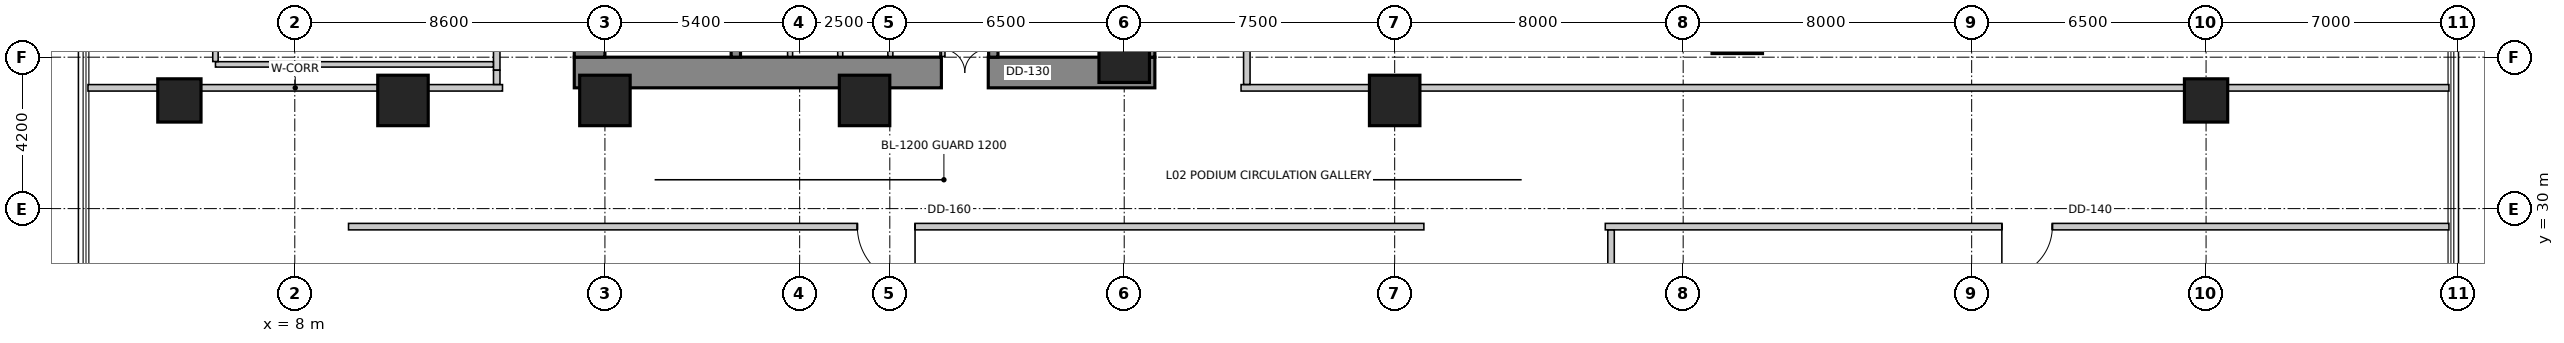
"""IFC4 building model, lengths in metres.
Left out: names, types, materials, properties, quantities, classifications, styles, units other than length and angle.
Written with IfcOpenShell. Run it as: python <this file> out.ifc"""

import sys

from ifc_helpers import new_model, si_unit, direction, frame, frame_2d, origin, origin_2d, place, context, subcontext, project, spatial, rectangle, extrude, source, transform, mapped, element, fill, save


model = new_model("IFC4")
c1 = context("Model", 3, precision=1e-05, world=origin(), true_north=direction((0.0, 1.0)))
c2 = subcontext(c1, "Body", "Model", "MODEL_VIEW")
j1 = project(units=[si_unit("LENGTHUNIT", "METRE"), si_unit("PLANEANGLEUNIT", "RADIAN")], contexts=[c1])
p1 = place(None, origin())
s1 = spatial("IfcSite", under=j1, at=p1, CompositionType="ELEMENT")
p2 = place(p1, origin())
s2 = spatial("IfcBuilding", under=s1, at=p2, CompositionType="ELEMENT")
p3 = place(p2, frame((0.0, 0.0, 6.0)))
s3 = spatial("IfcBuildingStorey", under=s2, at=p3, CompositionType="ELEMENT", Elevation=6.0)
p4 = place(p3, frame((15.75, 33.775, 0.0), z_axis=(0.0, 0.0, 1.0), x_axis=(1.0, 0.0, 0.0)))
e1 = element("IfcWall", 1, at=p4, inside=s3, PredefinedType="SHEAR", context=c2, shape_type="SweptSolid", body=[
    extrude(rectangle(XDim=16.1, YDim=0.85, at=frame_2d((8.05, 0.0))), origin(), (0.0, 0.0, 1.0), 5.2),
])
m1 = source(origin(), c2, "Body", "SweptSolid", [
    extrude(rectangle(XDim=1.3, YDim=2.15, at=frame_2d((0.65, 1.075))), frame((0.0, 0.435, 0.0), z_axis=(0.0, -1.0, 0.0), x_axis=(1.0, 0.0, 0.0)), (0.0, 0.0, 1.0), 0.87),
])
p5 = place(p4, frame((10.18, 0.0, 0.0)))
e2 = element("IfcOpeningElement", 2, at=p5, cuts=e1, PredefinedType="OPENING", context=c2, shape_type="MappedRepresentation", body=[
    mapped(m1, transform((0.0, 0.0, 0.0), scale=1.0)),
])
p6 = place(p3, frame((16.175, 34.2, 0.0), z_axis=(0.0, 0.0, 1.0), x_axis=(0.0, 1.0, 0.0)))
e3 = element("IfcWall", 3, at=p6, inside=s3, PredefinedType="SHEAR", context=c2, shape_type="SweptSolid", body=[
    extrude(rectangle(XDim=11.4, YDim=0.85, at=frame_2d((5.7, 0.0))), origin(), (0.0, 0.0, 1.0), 5.2),
])
m2 = source(origin(), c2, "Body", "SweptSolid", [
    extrude(rectangle(XDim=1.1, YDim=2.15, at=frame_2d((0.55, 1.075))), frame((0.0, 0.435, 0.0), z_axis=(0.0, -1.0, 0.0), x_axis=(1.0, 0.0, 0.0)), (0.0, 0.0, 1.0), 0.87),
])
p7 = place(p6, frame((7.15, 0.0, 0.0)))
e4 = element("IfcOpeningElement", 4, at=p7, cuts=e3, PredefinedType="OPENING", context=c2, shape_type="MappedRepresentation", body=[
    mapped(m2, transform((0.0, 0.0, 0.0), scale=1.0)),
])
p8 = place(p3, frame((31.425, 34.2, 0.0), z_axis=(0.0, 0.0, 1.0), x_axis=(0.0, 1.0, 0.0)))
e5 = element("IfcWall", 5, at=p8, inside=s3, PredefinedType="SHEAR", context=c2, shape_type="SweptSolid", body=[
    extrude(rectangle(XDim=11.4, YDim=0.85, at=frame_2d((5.7, 0.0))), origin(), (0.0, 0.0, 1.0), 5.2),
])
p9 = place(p8, frame((7.35, 0.0, 0.0)))
e6 = element("IfcOpeningElement", 6, at=p9, cuts=e5, PredefinedType="OPENING", context=c2, shape_type="MappedRepresentation", body=[
    mapped(m2, transform((0.0, 0.0, 0.0), scale=1.0)),
])
p10 = place(p3, frame((20.23, 34.2, 0.0), z_axis=(0.0, 0.0, 1.0), x_axis=(0.0, 1.0, 0.0)))
e7 = element("IfcWall", 7, at=p10, inside=s3, PredefinedType="SHEAR", context=c2, shape_type="SweptSolid", body=[
    extrude(rectangle(XDim=9.06, YDim=0.26, at=frame_2d((4.53, 0.0))), origin(), (0.0, 0.0, 1.0), 5.2),
])
m3 = source(origin(), c2, "Body", "SweptSolid", [
    extrude(rectangle(XDim=1.1, YDim=2.15, at=frame_2d((0.55, 1.075))), frame((0.0, 0.14, 0.0), z_axis=(0.0, -1.0, 0.0), x_axis=(1.0, 0.0, 0.0)), (0.0, 0.0, 1.0), 0.28),
])
p11 = place(p10, frame((7.45, 0.0, 0.0)))
e8 = element("IfcOpeningElement", 8, at=p11, cuts=e7, PredefinedType="OPENING", context=c2, shape_type="MappedRepresentation", body=[
    mapped(m3, transform((0.0, 0.0, 0.0), scale=1.0)),
])
p12 = place(p3, frame((27.37, 34.2, 0.0), z_axis=(0.0, 0.0, 1.0), x_axis=(0.0, 1.0, 0.0)))
e9 = element("IfcWall", 9, at=p12, inside=s3, PredefinedType="SHEAR", context=c2, shape_type="SweptSolid", body=[
    extrude(rectangle(XDim=9.06, YDim=0.26, at=frame_2d((4.53, 0.0))), origin(), (0.0, 0.0, 1.0), 5.2),
])
p13 = place(p12, frame((7.45, 0.0, 0.0)))
e10 = element("IfcOpeningElement", 10, at=p13, cuts=e9, PredefinedType="OPENING", context=c2, shape_type="MappedRepresentation", body=[
    mapped(m3, transform((0.0, 0.0, 0.0), scale=1.0)),
])
m4 = source(origin(), c2, "Body", "SweptSolid", [
    extrude(rectangle(XDim=1.2, YDim=1.2, at=origin_2d()), origin(), (0.0, 0.0, 1.0), 5.2),
])
p14 = place(p3, frame((4.8, 33.0, 0.0), z_axis=(0.0, 0.0, 1.0), x_axis=(1.0, 0.0, 0.0)))
e11 = element("IfcColumn", 11, at=p14, inside=s3, PredefinedType="COLUMN", context=c2, shape_type="MappedRepresentation", body=[
    mapped(m4, transform((0.0, 0.0, 0.0), scale=1.0)),
])
m5 = source(origin(), c2, "Body", "SweptSolid", [
    extrude(rectangle(XDim=1.4, YDim=1.4, at=origin_2d()), origin(), (0.0, 0.0, 1.0), 5.2),
])
for number, where, z_axis, x_axis in (
    (12, (11.0, 33.0, 0.0), (0.0, 0.0, 1.0), (1.0, 0.0, 0.0)),
    (13, (16.6, 33.0, 0.0), (0.0, 0.0, 1.0), (1.0, 0.0, 0.0)),
    (14, (23.8, 33.0, 0.0), (0.0, 0.0, 1.0), (1.0, 0.0, 0.0)),
    (15, (31.0, 34.2, 0.0), (0.0, 0.0, 1.0), (1.0, 0.0, 0.0)),
    (16, (38.5, 33.0, 0.0), (0.0, 0.0, 1.0), (1.0, 0.0, 0.0)),
    (17, (48.0, 35.0, 0.0), (0.0, 0.0, 1.0), (1.0, 0.0, 0.0)),
):
    element("IfcColumn", number, at=place(p3, frame(where, z_axis=z_axis, x_axis=x_axis)), inside=s3, PredefinedType="COLUMN", context=c2, shape_type="MappedRepresentation", body=[
        mapped(m5, transform((0.0, 0.0, 0.0), scale=1.0)),
    ])
p15 = place(p3, frame((61.0, 33.0, 0.0), z_axis=(0.0, 0.0, 1.0), x_axis=(1.0, 0.0, 0.0)))
e18 = element("IfcColumn", 18, at=p15, inside=s3, PredefinedType="COLUMN", context=c2, shape_type="MappedRepresentation", body=[
    mapped(m4, transform((0.0, 0.0, 0.0), scale=1.0)),
])
for number, where, z_axis, x_axis in (
    (19, (25.96, 34.22, 0.0), (0.0, 0.0, 1.0), (0.0, 1.0, 0.0)),
    (20, (21.735, 34.22, 0.0), (0.0, 0.0, 1.0), (0.0, 1.0, 0.0)),
    (21, (23.125, 34.22, 0.0), (0.0, 0.0, 1.0), (0.0, 1.0, 0.0)),
    (22, (24.515, 34.22, 0.0), (0.0, 0.0, 1.0), (0.0, 1.0, 0.0)),
):
    element("IfcWall", number, at=place(p3, frame(where, z_axis=z_axis, x_axis=x_axis)), inside=s3, PredefinedType="SOLIDWALL", context=c2, shape_type="SweptSolid", body=[
        extrude(rectangle(XDim=1.62, YDim=0.14, at=frame_2d((0.81, 0.0))), origin(), (0.0, 0.0, 1.0), 4.9),
    ])
p16 = place(p3, frame((2.265, 33.35, 0.0), z_axis=(0.0, 0.0, 1.0), x_axis=(1.0, 0.0, 0.0)))
e23 = element("IfcWall", 23, at=p16, inside=s3, PredefinedType="PARTITIONING", context=c2, shape_type="SweptSolid", body=[
    extrude(rectangle(XDim=11.495, YDim=0.18, at=frame_2d((5.748, 0.0))), origin(), (0.0, 0.0, 1.0), 3.692),
])
p17 = place(p3, frame((39.31, 29.5, 0.0), z_axis=(0.0, 0.0, 1.0), x_axis=(-1.0, 0.0, 0.0)))
e24 = element("IfcWall", 24, at=p17, inside=s3, PredefinedType="PARTITIONING", context=c2, shape_type="SweptSolid", body=[
    extrude(rectangle(XDim=29.82, YDim=0.18, at=frame_2d((14.91, 0.0))), origin(), (0.0, 0.0, 1.0), 4.03),
])
m6 = source(origin(), c2, "Body", "SweptSolid", [
    extrude(rectangle(XDim=1.6, YDim=2.15, at=frame_2d((0.8, 1.075))), frame((0.0, 0.1, 0.0), z_axis=(0.0, -1.0, 0.0), x_axis=(1.0, 0.0, 0.0)), (0.0, 0.0, 1.0), 0.2),
])
p18 = place(p17, frame((14.11, 0.0, 0.0)))
e25 = element("IfcOpeningElement", 25, at=p18, cuts=e24, PredefinedType="OPENING", context=c2, shape_type="MappedRepresentation", body=[
    mapped(m6, transform((0.0, 0.0, 0.0), scale=1.0)),
])
p19 = place(p3, frame((67.735, 29.5, 0.0), z_axis=(0.0, 0.0, 1.0), x_axis=(-1.0, 0.0, 0.0)))
e26 = element("IfcWall", 26, at=p19, inside=s3, PredefinedType="PARTITIONING", context=c2, shape_type="SweptSolid", body=[
    extrude(rectangle(XDim=23.395, YDim=0.18, at=frame_2d((11.698, 0.0))), origin(), (0.0, 0.0, 1.0), 3.092),
])
m7 = source(origin(), c2, "Body", "SweptSolid", [
    extrude(rectangle(XDim=1.4, YDim=2.15, at=frame_2d((0.7, 1.075))), frame((0.0, 0.1, 0.0), z_axis=(0.0, -1.0, 0.0), x_axis=(1.0, 0.0, 0.0)), (0.0, 0.0, 1.0), 0.2),
])
p20 = place(p19, frame((10.998, 0.0, 0.0)))
e27 = element("IfcOpeningElement", 27, at=p20, cuts=e26, PredefinedType="OPENING", context=c2, shape_type="MappedRepresentation", body=[
    mapped(m7, transform((0.0, 0.0, 0.0), scale=1.0)),
])
p21 = place(p3, frame((34.24, 33.35, 0.0), z_axis=(0.0, 0.0, 1.0), x_axis=(1.0, 0.0, 0.0)))
e28 = element("IfcWall", 28, at=p21, inside=s3, PredefinedType="PARTITIONING", context=c2, shape_type="SweptSolid", body=[
    extrude(rectangle(XDim=33.495, YDim=0.18, at=frame_2d((16.748, 0.0))), origin(), (0.0, 0.0, 1.0), 3.092),
])
p22 = place(p3, frame((44.5, 29.406, 0.0), z_axis=(0.0, 0.0, 1.0), x_axis=(0.0, -1.0, 0.0)))
e29 = element("IfcWall", 29, at=p22, inside=s3, PredefinedType="PARTITIONING", context=c2, shape_type="SweptSolid", body=[
    extrude(rectangle(XDim=15.006, YDim=0.18, at=frame_2d((7.503, 0.0))), origin(), (0.0, 0.0, 1.0), 3.692),
])
p23 = place(p3, frame((13.6, 33.84, 0.0), z_axis=(0.0, 0.0, 1.0), x_axis=(0.0, 1.0, 0.0)))
e30 = element("IfcWall", 30, at=p23, inside=s3, PredefinedType="PARTITIONING", context=c2, shape_type="SweptSolid", body=[
    extrude(rectangle(XDim=5.32, YDim=0.18, at=frame_2d((2.66, 0.0))), origin(), (0.0, 0.0, 1.0), 4.9),
])
m8 = source(origin(), c2, "Body", "SweptSolid", [
    extrude(rectangle(XDim=0.9, YDim=2.15, at=frame_2d((0.45, 1.075))), frame((0.0, 0.1, 0.0), z_axis=(0.0, -1.0, 0.0), x_axis=(1.0, 0.0, 0.0)), (0.0, 0.0, 1.0), 0.2),
])
p24 = place(p23, frame((2.21, 0.0, 0.0)))
e31 = element("IfcOpeningElement", 31, at=p24, cuts=e30, PredefinedType="OPENING", context=c2, shape_type="MappedRepresentation", body=[
    mapped(m8, transform((0.0, 0.0, 0.0), scale=1.0)),
])
p25 = place(p3, frame((13.6, 33.444, 0.0), z_axis=(0.0, 0.0, 1.0), x_axis=(0.0, 1.0, 0.0)))
e32 = element("IfcWall", 32, at=p25, inside=s3, PredefinedType="PARTITIONING", context=c2, shape_type="SweptSolid", body=[
    extrude(rectangle(XDim=0.394, YDim=0.18, at=frame_2d((0.197, 0.0))), origin(), (0.0, 0.0, 1.0), 4.9),
])
p26 = place(p3, frame((34.4, 48.0, 0.0), z_axis=(0.0, 0.0, 1.0), x_axis=(0.0, -1.0, 0.0)))
e33 = element("IfcWall", 33, at=p26, inside=s3, PredefinedType="PARTITIONING", context=c2, shape_type="SweptSolid", body=[
    extrude(rectangle(XDim=14.556, YDim=0.18, at=frame_2d((7.278, 0.0))), origin(), (0.0, 0.0, 1.0), 3.942),
])
p27 = place(p26, frame((6.578, 0.0, 0.0)))
e34 = element("IfcOpeningElement", 34, at=p27, cuts=e33, PredefinedType="OPENING", context=c2, shape_type="MappedRepresentation", body=[
    mapped(m7, transform((0.0, 0.0, 0.0), scale=1.0)),
])
p28 = place(p3, frame((13.506, 34.0, 0.0), z_axis=(0.0, 0.0, 1.0), x_axis=(-1.0, 0.0, 0.0)))
e35 = element("IfcWall", 35, at=p28, inside=s3, PredefinedType="PARTITIONING", context=c2, shape_type="SweptSolid", body=[
    extrude(rectangle(XDim=7.706, YDim=0.15, at=frame_2d((3.853, 0.0))), origin(), (0.0, 0.0, 1.0), 3.942),
])
p29 = place(p3, frame((5.8, 34.079, 0.0), z_axis=(0.0, 0.0, 1.0), x_axis=(0.0, 1.0, 0.0)))
e36 = element("IfcWall", 36, at=p29, inside=s3, PredefinedType="PARTITIONING", context=c2, shape_type="SweptSolid", body=[
    extrude(rectangle(XDim=4.842, YDim=0.15, at=frame_2d((2.421, 0.0))), origin(), (0.0, 0.0, 1.0), 4.9),
])
m9 = source(origin(), c2, "Body", "SweptSolid", [
    extrude(rectangle(XDim=1.3, YDim=2.15, at=frame_2d((0.65, 1.075))), frame((0.0, 0.025, 0.0), z_axis=(0.0, -1.0, 0.0), x_axis=(1.0, 0.0, 0.0)), (0.0, 0.0, 1.0), 0.05),
])
p30 = place(p5, origin())
e37 = element("IfcDoor", 37, at=p30, inside=s3, OperationType="DOUBLE_DOOR_SINGLE_SWING", PredefinedType="DOOR", context=c2, shape_type="MappedRepresentation", body=[
    mapped(m9, transform((0.0, 0.0, 0.0), scale=1.0)),
])
fill(e2, e37)
m10 = source(origin(), c2, "Body", "SweptSolid", [
    extrude(rectangle(XDim=1.6, YDim=2.15, at=frame_2d((0.8, 1.075))), frame((0.0, 0.025, 0.0), z_axis=(0.0, -1.0, 0.0), x_axis=(1.0, 0.0, 0.0)), (0.0, 0.0, 1.0), 0.05),
])
p31 = place(p18, origin())
e38 = element("IfcDoor", 38, at=p31, inside=s3, OperationType="SINGLE_SWING_LEFT", PredefinedType="DOOR", context=c2, shape_type="MappedRepresentation", body=[
    mapped(m10, transform((0.0, 0.0, 0.0), scale=1.0)),
])
fill(e25, e38)
m11 = source(origin(), c2, "Body", "SweptSolid", [
    extrude(rectangle(XDim=1.4, YDim=2.15, at=frame_2d((0.7, 1.075))), frame((0.0, 0.025, 0.0), z_axis=(0.0, -1.0, 0.0), x_axis=(1.0, 0.0, 0.0)), (0.0, 0.0, 1.0), 0.05),
])
p32 = place(p20, origin())
e39 = element("IfcDoor", 39, at=p32, inside=s3, OperationType="SINGLE_SWING_RIGHT", PredefinedType="DOOR", context=c2, shape_type="MappedRepresentation", body=[
    mapped(m11, transform((0.0, 0.0, 0.0), scale=1.0)),
])
fill(e27, e39)
save(model, sys.argv[1])
